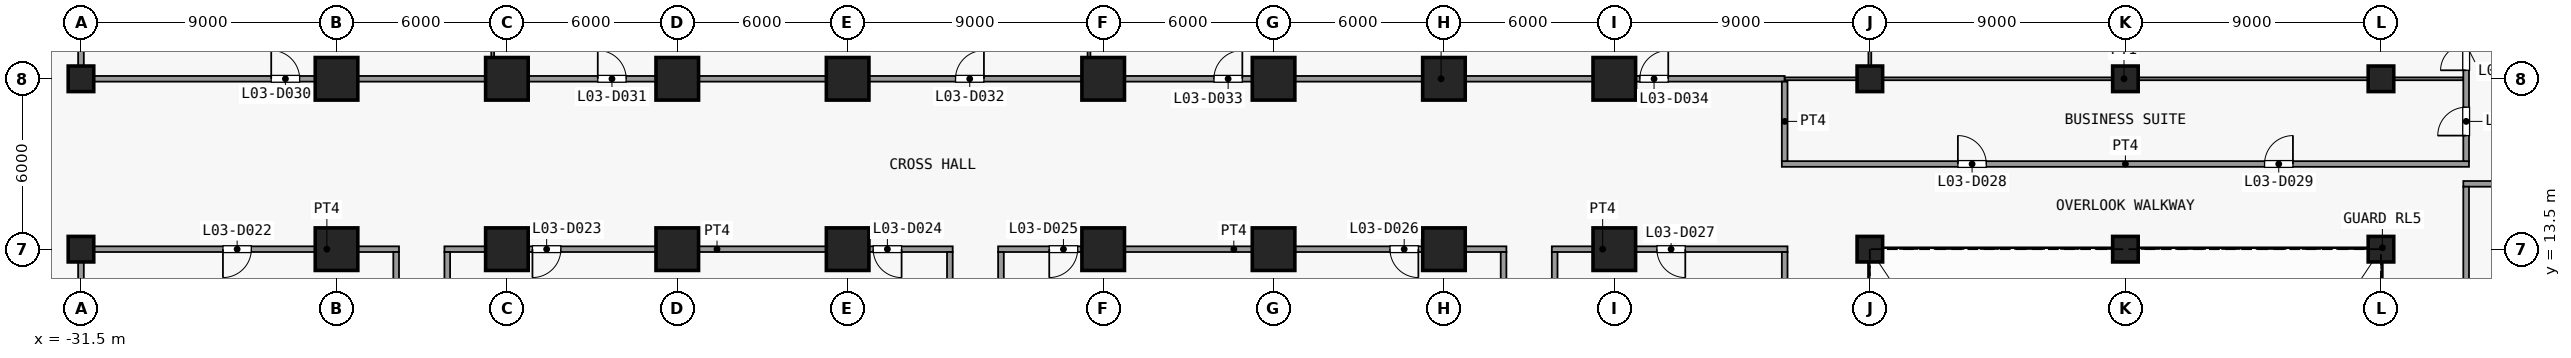
"""IFC4 building model, lengths in metres.
Left out: names, types, materials, properties, quantities, classifications, styles, units other than length and angle.
Written with IfcOpenShell. Run it as: python <this file> out.ifc"""

import sys

from ifc_helpers import new_model, si_unit, direction, frame, frame_2d, origin, origin_2d, place, context, subcontext, project, spatial, rectangle, extrude, element, fill, save


model = new_model("IFC4")
c1 = context("Model", 3, precision=1e-05, world=origin(), true_north=direction((0.0, 1.0)))
c2 = subcontext(c1, "Body", "Model", "MODEL_VIEW")
j1 = project(units=[si_unit("LENGTHUNIT", "METRE"), si_unit("PLANEANGLEUNIT", "RADIAN")], contexts=[c1])
p1 = place(None, origin())
s1 = spatial("IfcSite", under=j1, at=p1, CompositionType="ELEMENT")
p2 = place(p1, origin())
s2 = spatial("IfcBuilding", under=s1, at=p2, CompositionType="ELEMENT")
p3 = place(p2, frame((0.0, 0.0, 18.5)))
s3 = spatial("IfcBuildingStorey", under=s2, at=p3, CompositionType="ELEMENT", Elevation=18.5)
for number, where, z_axis, x_axis in (
    (1, (-31.5, 13.5, 0.0), (0.0, 0.0, 1.0), (1.0, 0.0, 0.0)),
    (2, (-31.5, 19.5, 0.0), (0.0, 0.0, 1.0), (1.0, 0.0, 0.0)),
):
    element("IfcColumn", number, at=place(p3, frame(where, z_axis=z_axis, x_axis=x_axis)), inside=s3, PredefinedType="COLUMN", context=c2, shape_type="SweptSolid", body=[
        extrude(rectangle(XDim=0.9, YDim=0.9, at=origin_2d()), origin(), (0.0, 0.0, 1.0), 5.0),
    ])
for number, where, z_axis, x_axis in (
    (3, (-22.5, 13.5, 0.0), (0.0, 0.0, 1.0), (1.0, 0.0, 0.0)),
    (4, (-22.5, 19.5, 0.0), (0.0, 0.0, 1.0), (1.0, 0.0, 0.0)),
    (5, (-16.5, 13.5, 0.0), (0.0, 0.0, 1.0), (1.0, 0.0, 0.0)),
    (6, (-16.5, 19.5, 0.0), (0.0, 0.0, 1.0), (1.0, 0.0, 0.0)),
    (7, (-10.5, 13.5, 0.0), (0.0, 0.0, 1.0), (1.0, 0.0, 0.0)),
    (8, (-10.5, 19.5, 0.0), (0.0, 0.0, 1.0), (1.0, 0.0, 0.0)),
    (9, (-4.5, 13.5, 0.0), (0.0, 0.0, 1.0), (1.0, 0.0, 0.0)),
    (10, (-4.5, 19.5, 0.0), (0.0, 0.0, 1.0), (1.0, 0.0, 0.0)),
    (11, (4.5, 13.5, 0.0), (0.0, 0.0, 1.0), (1.0, 0.0, 0.0)),
    (12, (4.5, 19.5, 0.0), (0.0, 0.0, 1.0), (1.0, 0.0, 0.0)),
    (13, (10.5, 13.5, 0.0), (0.0, 0.0, 1.0), (1.0, 0.0, 0.0)),
    (14, (10.5, 19.5, 0.0), (0.0, 0.0, 1.0), (1.0, 0.0, 0.0)),
    (15, (16.5, 13.5, 0.0), (0.0, 0.0, 1.0), (1.0, 0.0, 0.0)),
    (16, (16.5, 19.5, 0.0), (0.0, 0.0, 1.0), (1.0, 0.0, 0.0)),
    (17, (22.5, 13.5, 0.0), (0.0, 0.0, 1.0), (1.0, 0.0, 0.0)),
    (18, (22.5, 19.5, 0.0), (0.0, 0.0, 1.0), (1.0, 0.0, 0.0)),
):
    element("IfcColumn", number, at=place(p3, frame(where, z_axis=z_axis, x_axis=x_axis)), inside=s3, PredefinedType="COLUMN", context=c2, shape_type="SweptSolid", body=[
        extrude(rectangle(XDim=1.5, YDim=1.5, at=origin_2d()), origin(), (0.0, 0.0, 1.0), 5.0),
    ])
for number, where, z_axis, x_axis in (
    (19, (31.5, 13.5, 0.0), (0.0, 0.0, 1.0), (1.0, 0.0, 0.0)),
    (20, (31.5, 19.5, 0.0), (0.0, 0.0, 1.0), (1.0, 0.0, 0.0)),
    (21, (40.5, 13.5, 0.0), (0.0, 0.0, 1.0), (1.0, 0.0, 0.0)),
    (22, (40.5, 19.5, 0.0), (0.0, 0.0, 1.0), (1.0, 0.0, 0.0)),
    (23, (49.5, 13.5, 0.0), (0.0, 0.0, 1.0), (1.0, 0.0, 0.0)),
    (24, (49.5, 19.5, 0.0), (0.0, 0.0, 1.0), (1.0, 0.0, 0.0)),
):
    element("IfcColumn", number, at=place(p3, frame(where, z_axis=z_axis, x_axis=x_axis)), inside=s3, PredefinedType="COLUMN", context=c2, shape_type="SweptSolid", body=[
        extrude(rectangle(XDim=0.9, YDim=0.9, at=origin_2d()), origin(), (0.0, 0.0, 1.0), 5.0),
    ])
p4 = place(p3, frame((-31.6, 13.5, 0.0), z_axis=(0.0, 0.0, 1.0), x_axis=(1.0, 0.0, 0.0)))
e25 = element("IfcWall", 25, at=p4, inside=s3, PredefinedType="PARTITIONING", context=c2, shape_type="SweptSolid", body=[
    extrude(rectangle(XDim=11.3, YDim=0.2, at=frame_2d((5.65, 0.0))), origin(), (0.0, 0.0, 1.0), 4.65),
])
p5 = place(p4, frame((5.1, 0.0, 0.0)))
e26 = element("IfcOpeningElement", 26, at=p5, cuts=e25, PredefinedType="OPENING", context=c2, shape_type="SweptSolid", body=[
    extrude(rectangle(XDim=1.0, YDim=2.1, at=frame_2d((0.5, 1.05))), frame((0.0, 0.11, 0.0), z_axis=(0.0, -1.0, 0.0), x_axis=(1.0, 0.0, 0.0)), (0.0, 0.0, 1.0), 0.22),
])
p6 = place(p3, frame((-18.7, 13.5, 0.0), z_axis=(0.0, 0.0, 1.0), x_axis=(1.0, 0.0, 0.0)))
e27 = element("IfcWall", 27, at=p6, inside=s3, PredefinedType="PARTITIONING", context=c2, shape_type="SweptSolid", body=[
    extrude(rectangle(XDim=17.9, YDim=0.2, at=frame_2d((8.95, 0.0))), origin(), (0.0, 0.0, 1.0), 4.65),
])
p7 = place(p6, frame((3.1, 0.0, 0.0)))
e28 = element("IfcOpeningElement", 28, at=p7, cuts=e27, PredefinedType="OPENING", context=c2, shape_type="SweptSolid", body=[
    extrude(rectangle(XDim=1.0, YDim=2.1, at=frame_2d((0.5, 1.05))), frame((0.0, 0.11, 0.0), z_axis=(0.0, -1.0, 0.0), x_axis=(1.0, 0.0, 0.0)), (0.0, 0.0, 1.0), 0.22),
])
p8 = place(p6, frame((15.1, 0.0, 0.0)))
e29 = element("IfcOpeningElement", 29, at=p8, cuts=e27, PredefinedType="OPENING", context=c2, shape_type="SweptSolid", body=[
    extrude(rectangle(XDim=1.0, YDim=2.1, at=frame_2d((0.5, 1.05))), frame((0.0, 0.11, 0.0), z_axis=(0.0, -1.0, 0.0), x_axis=(1.0, 0.0, 0.0)), (0.0, 0.0, 1.0), 0.22),
])
p9 = place(p3, frame((0.8, 13.5, 0.0), z_axis=(0.0, 0.0, 1.0), x_axis=(1.0, 0.0, 0.0)))
e30 = element("IfcWall", 30, at=p9, inside=s3, PredefinedType="PARTITIONING", context=c2, shape_type="SweptSolid", body=[
    extrude(rectangle(XDim=17.9, YDim=0.2, at=frame_2d((8.95, 0.0))), origin(), (0.0, 0.0, 1.0), 4.65),
])
p10 = place(p9, frame((1.8, 0.0, 0.0)))
e31 = element("IfcOpeningElement", 31, at=p10, cuts=e30, PredefinedType="OPENING", context=c2, shape_type="SweptSolid", body=[
    extrude(rectangle(XDim=1.0, YDim=2.1, at=frame_2d((0.5, 1.05))), frame((0.0, 0.11, 0.0), z_axis=(0.0, -1.0, 0.0), x_axis=(1.0, 0.0, 0.0)), (0.0, 0.0, 1.0), 0.22),
])
p11 = place(p9, frame((13.8, 0.0, 0.0)))
e32 = element("IfcOpeningElement", 32, at=p11, cuts=e30, PredefinedType="OPENING", context=c2, shape_type="SweptSolid", body=[
    extrude(rectangle(XDim=1.0, YDim=2.1, at=frame_2d((0.5, 1.05))), frame((0.0, 0.11, 0.0), z_axis=(0.0, -1.0, 0.0), x_axis=(1.0, 0.0, 0.0)), (0.0, 0.0, 1.0), 0.22),
])
p12 = place(p3, frame((20.3, 13.5, 0.0), z_axis=(0.0, 0.0, 1.0), x_axis=(1.0, 0.0, 0.0)))
e33 = element("IfcWall", 33, at=p12, inside=s3, PredefinedType="PARTITIONING", context=c2, shape_type="SweptSolid", body=[
    extrude(rectangle(XDim=8.3, YDim=0.2, at=frame_2d((4.15, 0.0))), origin(), (0.0, 0.0, 1.0), 4.65),
])
p13 = place(p12, frame((3.7, 0.0, 0.0)))
e34 = element("IfcOpeningElement", 34, at=p13, cuts=e33, PredefinedType="OPENING", context=c2, shape_type="SweptSolid", body=[
    extrude(rectangle(XDim=1.0, YDim=2.1, at=frame_2d((0.5, 1.05))), frame((0.0, 0.11, 0.0), z_axis=(0.0, -1.0, 0.0), x_axis=(1.0, 0.0, 0.0)), (0.0, 0.0, 1.0), 0.22),
])
p14 = place(p3, frame((52.4, 15.8, 0.0), z_axis=(0.0, 0.0, 1.0), x_axis=(1.0, 0.0, 0.0)))
e35 = element("IfcWall", 35, at=p14, inside=s3, PredefinedType="PARTITIONING", context=c2, shape_type="SweptSolid", body=[
    extrude(rectangle(XDim=6.2, YDim=0.2, at=frame_2d((3.1, 0.0))), origin(), (0.0, 0.0, 1.0), 4.65),
])
p15 = place(p3, frame((28.4, 16.5, 0.0), z_axis=(0.0, 0.0, 1.0), x_axis=(1.0, 0.0, 0.0)))
e36 = element("IfcWall", 36, at=p15, inside=s3, PredefinedType="PARTITIONING", context=c2, shape_type="SweptSolid", body=[
    extrude(rectangle(XDim=24.2, YDim=0.2, at=frame_2d((12.1, 0.0))), origin(), (0.0, 0.0, 1.0), 4.65),
])
p16 = place(p15, frame((6.2, 0.0, 0.0)))
e37 = element("IfcOpeningElement", 37, at=p16, cuts=e36, PredefinedType="OPENING", context=c2, shape_type="SweptSolid", body=[
    extrude(rectangle(XDim=1.0, YDim=2.1, at=frame_2d((0.5, 1.05))), frame((0.0, 0.11, 0.0), z_axis=(0.0, -1.0, 0.0), x_axis=(1.0, 0.0, 0.0)), (0.0, 0.0, 1.0), 0.22),
])
p17 = place(p15, frame((17.0, 0.0, 0.0)))
e38 = element("IfcOpeningElement", 38, at=p17, cuts=e36, PredefinedType="OPENING", context=c2, shape_type="SweptSolid", body=[
    extrude(rectangle(XDim=1.0, YDim=2.1, at=frame_2d((0.5, 1.05))), frame((0.0, 0.11, 0.0), z_axis=(0.0, -1.0, 0.0), x_axis=(1.0, 0.0, 0.0)), (0.0, 0.0, 1.0), 0.22),
])
p18 = place(p3, frame((-31.6, 19.5, 0.0), z_axis=(0.0, 0.0, 1.0), x_axis=(1.0, 0.0, 0.0)))
e39 = element("IfcWall", 39, at=p18, inside=s3, PredefinedType="PARTITIONING", context=c2, shape_type="SweptSolid", body=[
    extrude(rectangle(XDim=60.1, YDim=0.2, at=frame_2d((30.05, 0.0))), origin(), (0.0, 0.0, 1.0), 4.65),
])
p19 = place(p18, frame((6.8, 0.0, 0.0)))
e40 = element("IfcOpeningElement", 40, at=p19, cuts=e39, PredefinedType="OPENING", context=c2, shape_type="SweptSolid", body=[
    extrude(rectangle(XDim=1.0, YDim=2.1, at=frame_2d((0.5, 1.05))), frame((0.0, 0.11, 0.0), z_axis=(0.0, -1.0, 0.0), x_axis=(1.0, 0.0, 0.0)), (0.0, 0.0, 1.0), 0.22),
])
p20 = place(p18, frame((18.3, 0.0, 0.0)))
e41 = element("IfcOpeningElement", 41, at=p20, cuts=e39, PredefinedType="OPENING", context=c2, shape_type="SweptSolid", body=[
    extrude(rectangle(XDim=1.0, YDim=2.1, at=frame_2d((0.5, 1.05))), frame((0.0, 0.11, 0.0), z_axis=(0.0, -1.0, 0.0), x_axis=(1.0, 0.0, 0.0)), (0.0, 0.0, 1.0), 0.22),
])
p21 = place(p18, frame((30.9, 0.0, 0.0)))
e42 = element("IfcOpeningElement", 42, at=p21, cuts=e39, PredefinedType="OPENING", context=c2, shape_type="SweptSolid", body=[
    extrude(rectangle(XDim=1.0, YDim=2.1, at=frame_2d((0.5, 1.05))), frame((0.0, 0.11, 0.0), z_axis=(0.0, -1.0, 0.0), x_axis=(1.0, 0.0, 0.0)), (0.0, 0.0, 1.0), 0.22),
])
p22 = place(p18, frame((40.0, 0.0, 0.0)))
e43 = element("IfcOpeningElement", 43, at=p22, cuts=e39, PredefinedType="OPENING", context=c2, shape_type="SweptSolid", body=[
    extrude(rectangle(XDim=1.0, YDim=2.1, at=frame_2d((0.5, 1.05))), frame((0.0, 0.11, 0.0), z_axis=(0.0, -1.0, 0.0), x_axis=(1.0, 0.0, 0.0)), (0.0, 0.0, 1.0), 0.22),
])
p23 = place(p18, frame((55.0, 0.0, 0.0)))
e44 = element("IfcOpeningElement", 44, at=p23, cuts=e39, PredefinedType="OPENING", context=c2, shape_type="SweptSolid", body=[
    extrude(rectangle(XDim=1.0, YDim=2.1, at=frame_2d((0.5, 1.05))), frame((0.0, 0.11, 0.0), z_axis=(0.0, -1.0, 0.0), x_axis=(1.0, 0.0, 0.0)), (0.0, 0.0, 1.0), 0.22),
])
p24 = place(p3, frame((28.5, 19.5, 0.0), z_axis=(0.0, 0.0, 1.0), x_axis=(1.0, 0.0, 0.0)))
e45 = element("IfcWall", 45, at=p24, inside=s3, PredefinedType="PARTITIONING", context=c2, shape_type="SweptSolid", body=[
    extrude(rectangle(XDim=23.9, YDim=0.1, at=frame_2d((11.95, 0.0))), origin(), (0.0, 0.0, 1.0), 4.65),
])
p25 = place(p3, frame((-31.5, 1.6, 0.0), z_axis=(0.0, 0.0, 1.0), x_axis=(0.0, 1.0, 0.0)))
e46 = element("IfcWall", 46, at=p25, inside=s3, PredefinedType="PARTITIONING", context=c2, shape_type="SweptSolid", body=[
    extrude(rectangle(XDim=11.8, YDim=0.2, at=frame_2d((5.9, 0.0))), origin(), (0.0, 0.0, 1.0), 4.65),
])
p26 = place(p3, frame((-31.5, 19.6, 0.0), z_axis=(0.0, 0.0, 1.0), x_axis=(0.0, 1.0, 0.0)))
e47 = element("IfcWall", 47, at=p26, inside=s3, PredefinedType="PARTITIONING", context=c2, shape_type="SweptSolid", body=[
    extrude(rectangle(XDim=11.8, YDim=0.2, at=frame_2d((5.9, 0.0))), origin(), (0.0, 0.0, 1.0), 4.65),
])
p27 = place(p26, frame((8.3, 0.0, 0.0)))
e48 = element("IfcOpeningElement", 48, at=p27, cuts=e47, PredefinedType="OPENING", context=c2, shape_type="SweptSolid", body=[
    extrude(rectangle(XDim=1.0, YDim=2.1, at=frame_2d((0.5, 1.05))), frame((0.0, 0.11, 0.0), z_axis=(0.0, -1.0, 0.0), x_axis=(1.0, 0.0, 0.0)), (0.0, 0.0, 1.0), 0.22),
])
for number, where, z_axis, x_axis in (
    (49, (-20.4, 1.6, 0.0), (0.0, 0.0, 1.0), (0.0, 1.0, 0.0)),
    (50, (-18.6, 1.6, 0.0), (0.0, 0.0, 1.0), (0.0, 1.0, 0.0)),
):
    element("IfcWall", number, at=place(p3, frame(where, z_axis=z_axis, x_axis=x_axis)), inside=s3, PredefinedType="PARTITIONING", context=c2, shape_type="SweptSolid", body=[
        extrude(rectangle(XDim=11.8, YDim=0.2, at=frame_2d((5.9, 0.0))), origin(), (0.0, 0.0, 1.0), 4.65),
    ])
p28 = place(p3, frame((-17.0, 19.6, 0.0), z_axis=(0.0, 0.0, 1.0), x_axis=(0.0, 1.0, 0.0)))
e51 = element("IfcWall", 51, at=p28, inside=s3, PredefinedType="PARTITIONING", context=c2, shape_type="SweptSolid", body=[
    extrude(rectangle(XDim=5.85, YDim=0.1, at=frame_2d((2.925, 0.0))), origin(), (0.0, 0.0, 1.0), 4.65),
])
for number, where, z_axis, x_axis in (
    (52, (-0.9, 1.6, 0.0), (0.0, 0.0, 1.0), (0.0, 1.0, 0.0)),
    (53, (0.9, 1.6, 0.0), (0.0, 0.0, 1.0), (0.0, 1.0, 0.0)),
):
    element("IfcWall", number, at=place(p3, frame(where, z_axis=z_axis, x_axis=x_axis)), inside=s3, PredefinedType="PARTITIONING", context=c2, shape_type="SweptSolid", body=[
        extrude(rectangle(XDim=11.8, YDim=0.2, at=frame_2d((5.9, 0.0))), origin(), (0.0, 0.0, 1.0), 4.65),
    ])
p29 = place(p3, frame((4.0, 19.6, 0.0), z_axis=(0.0, 0.0, 1.0), x_axis=(0.0, 1.0, 0.0)))
e54 = element("IfcWall", 54, at=p29, inside=s3, PredefinedType="PARTITIONING", context=c2, shape_type="SweptSolid", body=[
    extrude(rectangle(XDim=5.85, YDim=0.1, at=frame_2d((2.925, 0.0))), origin(), (0.0, 0.0, 1.0), 4.65),
])
for number, where, z_axis, x_axis in (
    (55, (18.6, 1.6, 0.0), (0.0, 0.0, 1.0), (0.0, 1.0, 0.0)),
    (56, (20.4, 1.6, 0.0), (0.0, 0.0, 1.0), (0.0, 1.0, 0.0)),
    (57, (28.5, 1.6, 0.0), (0.0, 0.0, 1.0), (0.0, 1.0, 0.0)),
):
    element("IfcWall", number, at=place(p3, frame(where, z_axis=z_axis, x_axis=x_axis)), inside=s3, PredefinedType="PARTITIONING", context=c2, shape_type="SweptSolid", body=[
        extrude(rectangle(XDim=11.8, YDim=0.2, at=frame_2d((5.9, 0.0))), origin(), (0.0, 0.0, 1.0), 4.65),
    ])
p30 = place(p3, frame((28.5, 16.6, 0.0), z_axis=(0.0, 0.0, 1.0), x_axis=(0.0, 1.0, 0.0)))
e58 = element("IfcWall", 58, at=p30, inside=s3, PredefinedType="PARTITIONING", context=c2, shape_type="SweptSolid", body=[
    extrude(rectangle(XDim=2.8, YDim=0.2, at=frame_2d((1.4, 0.0))), origin(), (0.0, 0.0, 1.0), 4.65),
])
p31 = place(p3, frame((31.5, 19.55, 0.0), z_axis=(0.0, 0.0, 1.0), x_axis=(0.0, 1.0, 0.0)))
e59 = element("IfcWall", 59, at=p31, inside=s3, PredefinedType="PARTITIONING", context=c2, shape_type="SweptSolid", body=[
    extrude(rectangle(XDim=5.9, YDim=0.1, at=frame_2d((2.95, 0.0))), origin(), (0.0, 0.0, 1.0), 4.65),
])
p32 = place(p3, frame((52.5, -16.5, 0.0), z_axis=(0.0, 0.0, 1.0), x_axis=(0.0, 1.0, 0.0)))
e60 = element("IfcWall", 60, at=p32, inside=s3, PredefinedType="PARTITIONING", context=c2, shape_type="SweptSolid", body=[
    extrude(rectangle(XDim=32.2, YDim=0.2, at=frame_2d((16.1, 0.0))), origin(), (0.0, 0.0, 1.0), 4.65),
])
p33 = place(p3, frame((52.5, 16.6, 0.0), z_axis=(0.0, 0.0, 1.0), x_axis=(0.0, 1.0, 0.0)))
e61 = element("IfcWall", 61, at=p33, inside=s3, PredefinedType="PARTITIONING", context=c2, shape_type="SweptSolid", body=[
    extrude(rectangle(XDim=8.87, YDim=0.2, at=frame_2d((4.435, 0.0))), origin(), (0.0, 0.0, 1.0), 4.65),
])
p34 = place(p33, frame((0.9, 0.0, 0.0)))
e62 = element("IfcOpeningElement", 62, at=p34, cuts=e61, PredefinedType="OPENING", context=c2, shape_type="SweptSolid", body=[
    extrude(rectangle(XDim=1.0, YDim=2.1, at=frame_2d((0.5, 1.05))), frame((0.0, 0.11, 0.0), z_axis=(0.0, -1.0, 0.0), x_axis=(1.0, 0.0, 0.0)), (0.0, 0.0, 1.0), 0.22),
])
p35 = place(p33, frame((3.2, 0.0, 0.0)))
e63 = element("IfcOpeningElement", 63, at=p35, cuts=e61, PredefinedType="OPENING", context=c2, shape_type="SweptSolid", body=[
    extrude(rectangle(XDim=1.8, YDim=2.1, at=frame_2d((0.9, 1.05))), frame((0.0, 0.11, 0.0), z_axis=(0.0, -1.0, 0.0), x_axis=(1.0, 0.0, 0.0)), (0.0, 0.0, 1.0), 0.22),
])
p36 = place(p33, frame((6.8, 0.0, 0.0)))
e64 = element("IfcOpeningElement", 64, at=p36, cuts=e61, PredefinedType="OPENING", context=c2, shape_type="SweptSolid", body=[
    extrude(rectangle(XDim=1.8, YDim=2.1, at=frame_2d((0.9, 1.05))), frame((0.0, 0.11, 0.0), z_axis=(0.0, -1.0, 0.0), x_axis=(1.0, 0.0, 0.0)), (0.0, 0.0, 1.0), 0.22),
])
p37 = place(p5, origin())
e65 = element("IfcDoor", 65, at=p37, inside=s3, OperationType="SINGLE_SWING_LEFT", PredefinedType="DOOR", context=c2, shape_type="SweptSolid", body=[
    extrude(rectangle(XDim=1.0, YDim=2.1, at=frame_2d((0.5, 1.05))), frame((0.0, 0.025, 0.0), z_axis=(0.0, -1.0, 0.0), x_axis=(1.0, 0.0, 0.0)), (0.0, 0.0, 1.0), 0.05),
])
fill(e26, e65)
p38 = place(p7, origin())
e66 = element("IfcDoor", 66, at=p38, inside=s3, OperationType="SINGLE_SWING_LEFT", PredefinedType="DOOR", context=c2, shape_type="SweptSolid", body=[
    extrude(rectangle(XDim=1.0, YDim=2.1, at=frame_2d((0.5, 1.05))), frame((0.0, 0.025, 0.0), z_axis=(0.0, -1.0, 0.0), x_axis=(1.0, 0.0, 0.0)), (0.0, 0.0, 1.0), 0.05),
])
fill(e28, e66)
p39 = place(p8, origin())
e67 = element("IfcDoor", 67, at=p39, inside=s3, OperationType="SINGLE_SWING_RIGHT", PredefinedType="DOOR", context=c2, shape_type="SweptSolid", body=[
    extrude(rectangle(XDim=1.0, YDim=2.1, at=frame_2d((0.5, 1.05))), frame((0.0, 0.025, 0.0), z_axis=(0.0, -1.0, 0.0), x_axis=(1.0, 0.0, 0.0)), (0.0, 0.0, 1.0), 0.05),
])
fill(e29, e67)
p40 = place(p10, origin())
e68 = element("IfcDoor", 68, at=p40, inside=s3, OperationType="SINGLE_SWING_LEFT", PredefinedType="DOOR", context=c2, shape_type="SweptSolid", body=[
    extrude(rectangle(XDim=1.0, YDim=2.1, at=frame_2d((0.5, 1.05))), frame((0.0, 0.025, 0.0), z_axis=(0.0, -1.0, 0.0), x_axis=(1.0, 0.0, 0.0)), (0.0, 0.0, 1.0), 0.05),
])
fill(e31, e68)
p41 = place(p11, origin())
e69 = element("IfcDoor", 69, at=p41, inside=s3, OperationType="SINGLE_SWING_RIGHT", PredefinedType="DOOR", context=c2, shape_type="SweptSolid", body=[
    extrude(rectangle(XDim=1.0, YDim=2.1, at=frame_2d((0.5, 1.05))), frame((0.0, 0.025, 0.0), z_axis=(0.0, -1.0, 0.0), x_axis=(1.0, 0.0, 0.0)), (0.0, 0.0, 1.0), 0.05),
])
fill(e32, e69)
p42 = place(p13, origin())
e70 = element("IfcDoor", 70, at=p42, inside=s3, OperationType="SINGLE_SWING_RIGHT", PredefinedType="DOOR", context=c2, shape_type="SweptSolid", body=[
    extrude(rectangle(XDim=1.0, YDim=2.1, at=frame_2d((0.5, 1.05))), frame((0.0, 0.025, 0.0), z_axis=(0.0, -1.0, 0.0), x_axis=(1.0, 0.0, 0.0)), (0.0, 0.0, 1.0), 0.05),
])
fill(e34, e70)
p43 = place(p16, origin())
e71 = element("IfcDoor", 71, at=p43, inside=s3, OperationType="SINGLE_SWING_RIGHT", PredefinedType="DOOR", context=c2, shape_type="SweptSolid", body=[
    extrude(rectangle(XDim=1.0, YDim=2.1, at=frame_2d((0.5, 1.05))), frame((0.0, 0.025, 0.0), z_axis=(0.0, -1.0, 0.0), x_axis=(1.0, 0.0, 0.0)), (0.0, 0.0, 1.0), 0.05),
])
fill(e37, e71)
p44 = place(p17, origin())
e72 = element("IfcDoor", 72, at=p44, inside=s3, OperationType="SINGLE_SWING_LEFT", PredefinedType="DOOR", context=c2, shape_type="SweptSolid", body=[
    extrude(rectangle(XDim=1.0, YDim=2.1, at=frame_2d((0.5, 1.05))), frame((0.0, 0.025, 0.0), z_axis=(0.0, -1.0, 0.0), x_axis=(1.0, 0.0, 0.0)), (0.0, 0.0, 1.0), 0.05),
])
fill(e38, e72)
p45 = place(p19, origin())
e73 = element("IfcDoor", 73, at=p45, inside=s3, OperationType="SINGLE_SWING_RIGHT", PredefinedType="DOOR", context=c2, shape_type="SweptSolid", body=[
    extrude(rectangle(XDim=1.0, YDim=2.1, at=frame_2d((0.5, 1.05))), frame((0.0, 0.025, 0.0), z_axis=(0.0, -1.0, 0.0), x_axis=(1.0, 0.0, 0.0)), (0.0, 0.0, 1.0), 0.05),
])
fill(e40, e73)
p46 = place(p20, origin())
e74 = element("IfcDoor", 74, at=p46, inside=s3, OperationType="SINGLE_SWING_RIGHT", PredefinedType="DOOR", context=c2, shape_type="SweptSolid", body=[
    extrude(rectangle(XDim=1.0, YDim=2.1, at=frame_2d((0.5, 1.05))), frame((0.0, 0.025, 0.0), z_axis=(0.0, -1.0, 0.0), x_axis=(1.0, 0.0, 0.0)), (0.0, 0.0, 1.0), 0.05),
])
fill(e41, e74)
p47 = place(p21, origin())
e75 = element("IfcDoor", 75, at=p47, inside=s3, OperationType="SINGLE_SWING_LEFT", PredefinedType="DOOR", context=c2, shape_type="SweptSolid", body=[
    extrude(rectangle(XDim=1.0, YDim=2.1, at=frame_2d((0.5, 1.05))), frame((0.0, 0.025, 0.0), z_axis=(0.0, -1.0, 0.0), x_axis=(1.0, 0.0, 0.0)), (0.0, 0.0, 1.0), 0.05),
])
fill(e42, e75)
p48 = place(p22, origin())
e76 = element("IfcDoor", 76, at=p48, inside=s3, OperationType="SINGLE_SWING_LEFT", PredefinedType="DOOR", context=c2, shape_type="SweptSolid", body=[
    extrude(rectangle(XDim=1.0, YDim=2.1, at=frame_2d((0.5, 1.05))), frame((0.0, 0.025, 0.0), z_axis=(0.0, -1.0, 0.0), x_axis=(1.0, 0.0, 0.0)), (0.0, 0.0, 1.0), 0.05),
])
fill(e43, e76)
p49 = place(p23, origin())
e77 = element("IfcDoor", 77, at=p49, inside=s3, OperationType="SINGLE_SWING_LEFT", PredefinedType="DOOR", context=c2, shape_type="SweptSolid", body=[
    extrude(rectangle(XDim=1.0, YDim=2.1, at=frame_2d((0.5, 1.05))), frame((0.0, 0.025, 0.0), z_axis=(0.0, -1.0, 0.0), x_axis=(1.0, 0.0, 0.0)), (0.0, 0.0, 1.0), 0.05),
])
fill(e44, e77)
p50 = place(p34, origin())
e78 = element("IfcDoor", 78, at=p50, inside=s3, OperationType="SINGLE_SWING_RIGHT", PredefinedType="DOOR", context=c2, shape_type="SweptSolid", body=[
    extrude(rectangle(XDim=1.0, YDim=2.1, at=frame_2d((0.5, 1.05))), frame((0.0, 0.025, 0.0), z_axis=(0.0, -1.0, 0.0), x_axis=(1.0, 0.0, 0.0)), (0.0, 0.0, 1.0), 0.05),
])
fill(e62, e78)
p51 = place(p35, origin())
e79 = element("IfcDoor", 79, at=p51, inside=s3, OperationType="DOUBLE_DOOR_SINGLE_SWING", PredefinedType="DOOR", context=c2, shape_type="SweptSolid", body=[
    extrude(rectangle(XDim=1.8, YDim=2.1, at=frame_2d((0.9, 1.05))), frame((0.0, 0.025, 0.0), z_axis=(0.0, -1.0, 0.0), x_axis=(1.0, 0.0, 0.0)), (0.0, 0.0, 1.0), 0.05),
])
fill(e63, e79)
save(model, sys.argv[1])
